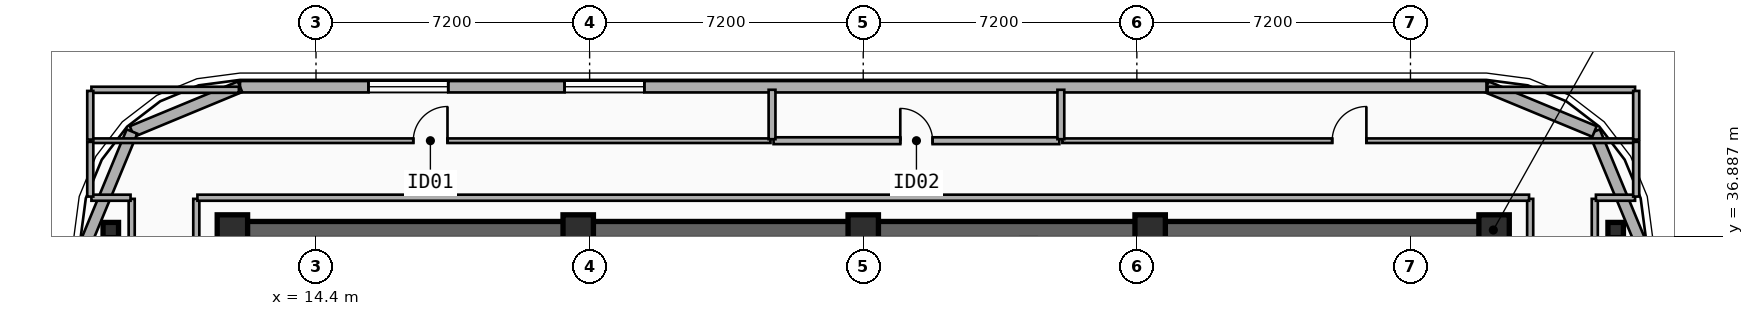
"""IFC4 building model, lengths in metres.
Left out: names, types, materials, properties, quantities, classifications, styles, units other than length and angle.
Written with IfcOpenShell. Run it as: python <this file> out.ifc"""

import sys

from ifc_helpers import new_model, si_unit, direction, frame, frame_2d, origin, origin_2d, place, context, subcontext, project, spatial, rectangle, i_section, extrude, element, fill, save


model = new_model("IFC4")
c1 = context("Model", 3, precision=1e-05, world=origin(), true_north=direction((0.0, 1.0)))
c2 = subcontext(c1, "Body", "Model", "MODEL_VIEW")
j1 = project(units=[si_unit("LENGTHUNIT", "METRE"), si_unit("PLANEANGLEUNIT", "RADIAN")], contexts=[c1])
p1 = place(None, origin())
s1 = spatial("IfcSite", under=j1, at=p1, CompositionType="ELEMENT")
p2 = place(p1, origin())
s2 = spatial("IfcBuilding", under=s1, at=p2, CompositionType="ELEMENT")
p3 = place(p2, frame((0.0, 0.0, 251.0)))
s3 = spatial("IfcBuildingStorey", under=s2, at=p3, CompositionType="ELEMENT", Elevation=251.0)
p4 = place(p3, frame((12.15, 37.05, 0.0), z_axis=(0.0, 0.0, 1.0), x_axis=(1.0, 0.0, 0.0)))
e1 = element("IfcWall", 1, at=p4, inside=s3, PredefinedType="SHEAR", context=c2, shape_type="SweptSolid", body=[
    extrude(rectangle(XDim=33.23, YDim=0.45, at=frame_2d((16.615, 0.0))), origin(), (0.0, 0.0, 1.0), 3.7),
])
for number, where, z_axis, x_axis in (
    (2, (12.2, 37.05, 0.0), (0.0, 0.0, 1.0), (1.0, 0.0, 0.0)),
    (3, (21.3, 37.05, 0.0), (0.0, 0.0, 1.0), (1.0, 0.0, 0.0)),
    (4, (28.8, 37.05, 0.0), (0.0, 0.0, 1.0), (1.0, 0.0, 0.0)),
    (5, (36.35, 37.05, 0.0), (0.0, 0.0, 1.0), (1.0, 0.0, 0.0)),
    (6, (45.4, 37.05, 0.0), (0.0, 0.0, 1.0), (1.0, 0.0, 0.0)),
):
    element("IfcColumn", number, at=place(p3, frame(where, z_axis=z_axis, x_axis=x_axis)), inside=s3, PredefinedType="COLUMN", context=c2, shape_type="SweptSolid", body=[
        extrude(rectangle(XDim=0.8, YDim=0.8, at=origin_2d()), origin(), (0.0, 0.0, 1.0), 3.7),
    ])
for number, where, z_axis, x_axis in (
    (7, (9.0, 37.05, 0.0), (0.0, 0.0, 1.0), (1.0, 0.0, 0.0)),
    (8, (48.6, 37.05, 0.0), (0.0, 0.0, 1.0), (1.0, 0.0, 0.0)),
):
    element("IfcColumn", number, at=place(p3, frame(where, z_axis=z_axis, x_axis=x_axis)), inside=s3, PredefinedType="COLUMN", context=c2, shape_type="SweptSolid", body=[
        extrude(i_section(OverallWidth=0.408, OverallDepth=0.4, WebThickness=0.025, FlangeThickness=0.039, FilletRadius=0.015, at=origin_2d()), origin(), (0.0, 0.0, 1.0), 3.7),
    ])
for number, where, z_axis, x_axis in (
    (9, (48.042, 39.643, 0.0), (0.0, 0.0, 1.0), (0.383, -0.924, 0.0)),
    (10, (45.2, 40.82, 0.0), (0.0, 0.0, 1.0), (0.924, -0.383, 0.0)),
):
    element("IfcWall", number, at=place(p3, frame(where, z_axis=z_axis, x_axis=x_axis)), inside=s3, PredefinedType="SOLIDWALL", context=c2, shape_type="SweptSolid", body=[
        extrude(rectangle(XDim=3.077, YDim=0.3, at=frame_2d((1.538, 0.0))), origin(), (0.0, 0.0, 1.0), 3.42),
    ])
p5 = place(p3, frame((12.4, 40.82, 0.0), z_axis=(0.0, 0.0, 1.0), x_axis=(1.0, 0.0, 0.0)))
e11 = element("IfcWall", 11, at=p5, inside=s3, PredefinedType="SOLIDWALL", context=c2, shape_type="SweptSolid", body=[
    extrude(rectangle(XDim=32.8, YDim=0.3, at=frame_2d((16.4, 0.0))), origin(), (0.0, 0.0, 1.0), 3.42),
])
p6 = place(p5, frame((3.38, 0.0, 0.75)))
e12 = element("IfcOpeningElement", 12, at=p6, cuts=e11, PredefinedType="OPENING", context=c2, shape_type="SweptSolid", body=[
    extrude(rectangle(XDim=2.1, YDim=2.1, at=frame_2d((1.05, 1.05))), frame((0.0, 0.16, 0.0), z_axis=(0.0, -1.0, 0.0), x_axis=(1.0, 0.0, 0.0)), (0.0, 0.0, 1.0), 0.32),
])
p7 = place(p5, frame((8.54, 0.0, 0.75)))
e13 = element("IfcOpeningElement", 13, at=p7, cuts=e11, PredefinedType="OPENING", context=c2, shape_type="SweptSolid", body=[
    extrude(rectangle(XDim=2.1, YDim=2.1, at=frame_2d((1.05, 1.05))), frame((0.0, 0.16, 0.0), z_axis=(0.0, -1.0, 0.0), x_axis=(1.0, 0.0, 0.0)), (0.0, 0.0, 1.0), 0.32),
])
for number, where, z_axis, x_axis in (
    (14, (9.557, 39.643, 0.0), (0.0, 0.0, 1.0), (0.924, 0.383, 0.0)),
    (15, (8.38, 36.8, 0.0), (0.0, 0.0, 1.0), (0.383, 0.924, 0.0)),
):
    element("IfcWall", number, at=place(p3, frame(where, z_axis=z_axis, x_axis=x_axis)), inside=s3, PredefinedType="SOLIDWALL", context=c2, shape_type="SweptSolid", body=[
        extrude(rectangle(XDim=3.077, YDim=0.3, at=frame_2d((1.538, 0.0))), origin(), (0.0, 0.0, 1.0), 3.42),
    ])
p8 = place(p3, frame((8.46, 39.4, 0.0), z_axis=(0.0, 0.0, 1.0), x_axis=(1.0, 0.0, 0.0)))
e16 = element("IfcWall", 16, at=p8, inside=s3, PredefinedType="PARTITIONING", context=c2, shape_type="SweptSolid", body=[
    extrude(rectangle(XDim=17.9, YDim=0.12, at=frame_2d((8.95, 0.0))), origin(), (0.0, 0.0, 1.0), 3.42),
])
p9 = place(p8, frame((8.5, 0.0, 0.0)))
e17 = element("IfcOpeningElement", 17, at=p9, cuts=e16, PredefinedType="OPENING", context=c2, shape_type="SweptSolid", body=[
    extrude(rectangle(XDim=0.9, YDim=2.1, at=frame_2d((0.45, 1.05))), frame((0.0, 0.07, 0.0), z_axis=(0.0, -1.0, 0.0), x_axis=(1.0, 0.0, 0.0)), (0.0, 0.0, 1.0), 0.14),
])
p10 = place(p3, frame((26.44, 39.4, 0.0), z_axis=(0.0, 0.0, 1.0), x_axis=(1.0, 0.0, 0.0)))
e18 = element("IfcWall", 18, at=p10, inside=s3, PredefinedType="PLUMBINGWALL", context=c2, shape_type="SweptSolid", body=[
    extrude(rectangle(XDim=7.52, YDim=0.18, at=frame_2d((3.76, 0.0))), origin(), (0.0, 0.0, 1.0), 3.42),
])
p11 = place(p10, frame((3.335, 0.0, 0.0)))
e19 = element("IfcOpeningElement", 19, at=p11, cuts=e18, PredefinedType="OPENING", context=c2, shape_type="SweptSolid", body=[
    extrude(rectangle(XDim=0.85, YDim=2.1, at=frame_2d((0.425, 1.05))), frame((0.0, 0.1, 0.0), z_axis=(0.0, -1.0, 0.0), x_axis=(1.0, 0.0, 0.0)), (0.0, 0.0, 1.0), 0.2),
])
p12 = place(p3, frame((34.04, 39.4, 0.0), z_axis=(0.0, 0.0, 1.0), x_axis=(1.0, 0.0, 0.0)))
e20 = element("IfcWall", 20, at=p12, inside=s3, PredefinedType="PARTITIONING", context=c2, shape_type="SweptSolid", body=[
    extrude(rectangle(XDim=15.1, YDim=0.12, at=frame_2d((7.55, 0.0))), origin(), (0.0, 0.0, 1.0), 3.42),
])
p13 = place(p12, frame((7.1, 0.0, 0.0)))
e21 = element("IfcOpeningElement", 21, at=p13, cuts=e20, PredefinedType="OPENING", context=c2, shape_type="SweptSolid", body=[
    extrude(rectangle(XDim=0.9, YDim=2.1, at=frame_2d((0.45, 1.05))), frame((0.0, 0.07, 0.0), z_axis=(0.0, -1.0, 0.0), x_axis=(1.0, 0.0, 0.0)), (0.0, 0.0, 1.0), 0.14),
])
for number, where, z_axis, x_axis in (
    (22, (26.4, 39.44, 0.0), (0.0, 0.0, 1.0), (0.0, 1.0, 0.0)),
    (23, (34.0, 39.44, 0.0), (0.0, 0.0, 1.0), (0.0, 1.0, 0.0)),
):
    element("IfcWall", number, at=place(p3, frame(where, z_axis=z_axis, x_axis=x_axis)), inside=s3, PredefinedType="PLUMBINGWALL", context=c2, shape_type="SweptSolid", body=[
        extrude(rectangle(XDim=1.3, YDim=0.18, at=frame_2d((0.65, 0.0))), origin(), (0.0, 0.0, 1.0), 3.42),
    ])
for number, where, z_axis, x_axis in (
    (24, (9.55, 27.63, 0.0), (0.0, 0.0, 1.0), (0.0, 1.0, 0.0)),
    (25, (11.25, 27.63, 0.0), (0.0, 0.0, 1.0), (0.0, 1.0, 0.0)),
    (26, (46.35, 27.63, 0.0), (0.0, 0.0, 1.0), (0.0, 1.0, 0.0)),
    (27, (48.05, 27.63, 0.0), (0.0, 0.0, 1.0), (0.0, 1.0, 0.0)),
):
    element("IfcWall", number, at=place(p3, frame(where, z_axis=z_axis, x_axis=x_axis)), inside=s3, PredefinedType="PARTITIONING", context=c2, shape_type="SweptSolid", body=[
        extrude(rectangle(XDim=10.24, YDim=0.16, at=frame_2d((5.12, 0.0))), origin(), (0.0, 0.0, 1.0), 2.9),
    ])
p14 = place(p3, frame((8.49, 37.9, 0.0), z_axis=(0.0, 0.0, 1.0), x_axis=(1.0, 0.0, 0.0)))
e28 = element("IfcWall", 28, at=p14, inside=s3, PredefinedType="PARTITIONING", context=c2, shape_type="SweptSolid", body=[
    extrude(rectangle(XDim=1.03, YDim=0.16, at=frame_2d((0.515, 0.0))), origin(), (0.0, 0.0, 1.0), 3.42),
])
p15 = place(p3, frame((11.28, 37.9, 0.0), z_axis=(0.0, 0.0, 1.0), x_axis=(1.0, 0.0, 0.0)))
e29 = element("IfcWall", 29, at=p15, inside=s3, PredefinedType="PARTITIONING", context=c2, shape_type="SweptSolid", body=[
    extrude(rectangle(XDim=35.04, YDim=0.16, at=frame_2d((17.52, 0.0))), origin(), (0.0, 0.0, 1.0), 3.42),
])
p16 = place(p3, frame((48.08, 37.9, 0.0), z_axis=(0.0, 0.0, 1.0), x_axis=(1.0, 0.0, 0.0)))
e30 = element("IfcWall", 30, at=p16, inside=s3, PredefinedType="PARTITIONING", context=c2, shape_type="SweptSolid", body=[
    extrude(rectangle(XDim=1.03, YDim=0.16, at=frame_2d((0.515, 0.0))), origin(), (0.0, 0.0, 1.0), 3.42),
])
for number, where, z_axis, x_axis in (
    (31, (8.46, 37.93, 0.0), (0.0, 0.0, 1.0), (0.0, 1.0, 0.0)),
    (32, (49.14, 37.93, 0.0), (0.0, 0.0, 1.0), (0.0, 1.0, 0.0)),
):
    element("IfcWall", number, at=place(p3, frame(where, z_axis=z_axis, x_axis=x_axis)), inside=s3, PredefinedType="PARTITIONING", context=c2, shape_type="SweptSolid", body=[
        extrude(rectangle(XDim=1.44, YDim=0.16, at=frame_2d((0.72, 0.0))), origin(), (0.0, 0.0, 1.0), 3.42),
    ])
p17 = place(p3, frame((8.49, 40.74, 0.0), z_axis=(0.0, 0.0, 1.0), x_axis=(1.0, 0.0, 0.0)))
e33 = element("IfcWall", 33, at=p17, inside=s3, PredefinedType="PARTITIONING", context=c2, shape_type="SweptSolid", body=[
    extrude(rectangle(XDim=3.88, YDim=0.16, at=frame_2d((1.94, 0.0))), origin(), (0.0, 0.0, 1.0), 3.42),
])
p18 = place(p3, frame((8.46, 39.43, 0.0), z_axis=(0.0, 0.0, 1.0), x_axis=(0.0, 1.0, 0.0)))
e34 = element("IfcWall", 34, at=p18, inside=s3, PredefinedType="PARTITIONING", context=c2, shape_type="SweptSolid", body=[
    extrude(rectangle(XDim=1.28, YDim=0.16, at=frame_2d((0.64, 0.0))), origin(), (0.0, 0.0, 1.0), 3.42),
])
p19 = place(p3, frame((45.23, 40.74, 0.0), z_axis=(0.0, 0.0, 1.0), x_axis=(1.0, 0.0, 0.0)))
e35 = element("IfcWall", 35, at=p19, inside=s3, PredefinedType="PARTITIONING", context=c2, shape_type="SweptSolid", body=[
    extrude(rectangle(XDim=3.88, YDim=0.16, at=frame_2d((1.94, 0.0))), origin(), (0.0, 0.0, 1.0), 3.42),
])
p20 = place(p3, frame((49.14, 39.43, 0.0), z_axis=(0.0, 0.0, 1.0), x_axis=(0.0, 1.0, 0.0)))
e36 = element("IfcWall", 36, at=p20, inside=s3, PredefinedType="PARTITIONING", context=c2, shape_type="SweptSolid", body=[
    extrude(rectangle(XDim=1.28, YDim=0.16, at=frame_2d((0.64, 0.0))), origin(), (0.0, 0.0, 1.0), 3.42),
])
p21 = place(p6, origin())
e37 = element("IfcWindow", 37, at=p21, inside=s3, PartitioningType="SINGLE_PANEL", PredefinedType="WINDOW", context=c2, shape_type="SweptSolid", body=[
    extrude(rectangle(XDim=2.1, YDim=2.1, at=frame_2d((1.05, 1.05))), frame((0.0, 0.03, 0.0), z_axis=(0.0, -1.0, 0.0), x_axis=(1.0, 0.0, 0.0)), (0.0, 0.0, 1.0), 0.06),
])
fill(e12, e37)
p22 = place(p7, origin())
e38 = element("IfcWindow", 38, at=p22, inside=s3, PartitioningType="SINGLE_PANEL", PredefinedType="WINDOW", context=c2, shape_type="SweptSolid", body=[
    extrude(rectangle(XDim=2.1, YDim=2.1, at=frame_2d((1.05, 1.05))), frame((0.0, 0.03, 0.0), z_axis=(0.0, -1.0, 0.0), x_axis=(1.0, 0.0, 0.0)), (0.0, 0.0, 1.0), 0.06),
])
fill(e13, e38)
p23 = place(p9, origin())
e39 = element("IfcDoor", 39, at=p23, inside=s3, OperationType="SINGLE_SWING_RIGHT", PredefinedType="DOOR", context=c2, shape_type="SweptSolid", body=[
    extrude(rectangle(XDim=0.9, YDim=2.1, at=frame_2d((0.45, 1.05))), frame((0.0, 0.025, 0.0), z_axis=(0.0, -1.0, 0.0), x_axis=(1.0, 0.0, 0.0)), (0.0, 0.0, 1.0), 0.05),
])
fill(e17, e39)
p24 = place(p11, origin())
e40 = element("IfcDoor", 40, at=p24, inside=s3, OperationType="SINGLE_SWING_LEFT", PredefinedType="DOOR", context=c2, shape_type="SweptSolid", body=[
    extrude(rectangle(XDim=0.85, YDim=2.1, at=frame_2d((0.425, 1.05))), frame((0.0, 0.025, 0.0), z_axis=(0.0, -1.0, 0.0), x_axis=(1.0, 0.0, 0.0)), (0.0, 0.0, 1.0), 0.05),
])
fill(e19, e40)
p25 = place(p13, origin())
e41 = element("IfcDoor", 41, at=p25, inside=s3, OperationType="SINGLE_SWING_RIGHT", PredefinedType="DOOR", context=c2, shape_type="SweptSolid", body=[
    extrude(rectangle(XDim=0.9, YDim=2.1, at=frame_2d((0.45, 1.05))), frame((0.0, 0.025, 0.0), z_axis=(0.0, -1.0, 0.0), x_axis=(1.0, 0.0, 0.0)), (0.0, 0.0, 1.0), 0.05),
])
fill(e21, e41)
save(model, sys.argv[1])
